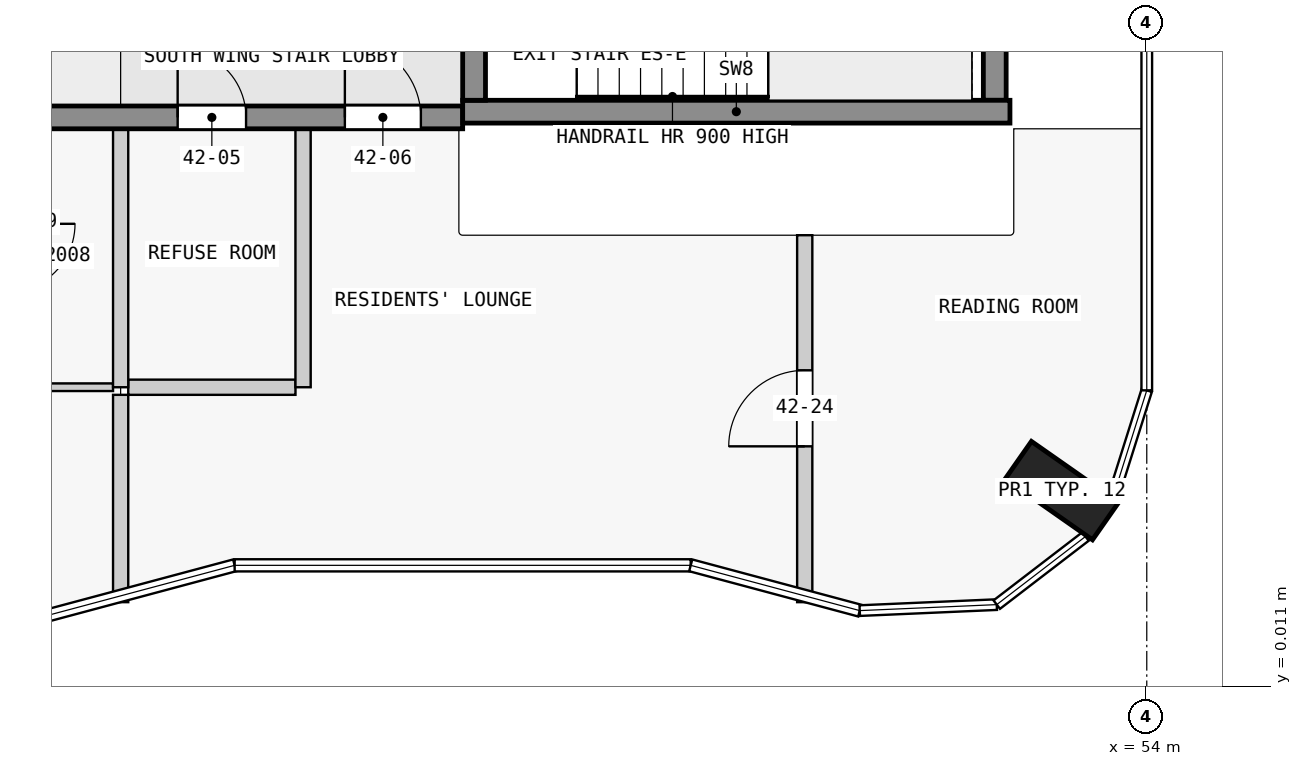
"""IFC4 building model, lengths in metres.
Left out: names, types, materials, properties, quantities, classifications, styles, units other than length and angle.
Written with IfcOpenShell. Run it as: python <this file> out.ifc"""

import sys

from ifc_helpers import new_model, si_unit, direction, frame, frame_2d, origin, origin_2d, place, context, subcontext, project, spatial, rectangle, extrude, element, fill, save


model = new_model("IFC4")
c1 = context("Model", 3, precision=1e-05, world=origin(), true_north=direction((0.0, 1.0)))
c2 = subcontext(c1, "Body", "Model", "MODEL_VIEW")
j1 = project(units=[si_unit("LENGTHUNIT", "METRE"), si_unit("PLANEANGLEUNIT", "RADIAN")], contexts=[c1])
p1 = place(None, origin())
s1 = spatial("IfcSite", under=j1, at=p1, CompositionType="ELEMENT")
p2 = place(p1, origin())
s2 = spatial("IfcBuilding", under=s1, at=p2, CompositionType="ELEMENT")
p3 = place(p2, frame((0.0, 0.0, 163.9)))
s3 = spatial("IfcBuildingStorey", under=s2, at=p3, CompositionType="ELEMENT", Elevation=163.9)
p4 = place(p3, frame((52.884, 2.59, 0.0), z_axis=(0.0, 0.0, 1.0), x_axis=(0.573542637991, 0.819175709117, 0.0)))
e1 = element("IfcColumn", 1, at=p4, inside=s3, PredefinedType="COLUMN", context=c2, shape_type="SweptSolid", body=[
    extrude(rectangle(XDim=0.6, YDim=1.4, at=origin_2d()), origin(), (0.0, 0.0, 1.0), 3.5),
])
p5 = place(p3, frame((45.15, 7.725, 0.0), z_axis=(0.0, 0.0, 1.0), x_axis=(0.0, 1.0, 0.0)))
e2 = element("IfcWall", 2, at=p5, inside=s3, PredefinedType="SHEAR", context=c2, shape_type="SweptSolid", body=[
    extrude(rectangle(XDim=2.55, YDim=0.3, at=frame_2d((1.275, 0.0))), origin(), (0.0, 0.0, 1.0), 3.5),
])
p6 = place(p5, frame((0.725, 0.0, 0.0)))
e3 = element("IfcOpeningElement", 3, at=p6, cuts=e2, PredefinedType="OPENING", context=c2, shape_type="SweptSolid", body=[
    extrude(rectangle(XDim=1.1, YDim=2.1, at=frame_2d((0.55, 1.05))), frame((0.0, 0.16, 0.0), z_axis=(0.0, -1.0, 0.0), x_axis=(1.0, 0.0, 0.0)), (0.0, 0.0, 1.0), 0.32),
])
p7 = place(p3, frame((52.0, 7.725, 0.0), z_axis=(0.0, 0.0, 1.0), x_axis=(0.0, 1.0, 0.0)))
e4 = element("IfcWall", 4, at=p7, inside=s3, PredefinedType="SHEAR", context=c2, shape_type="SweptSolid", body=[
    extrude(rectangle(XDim=2.55, YDim=0.3, at=frame_2d((1.275, 0.0))), origin(), (0.0, 0.0, 1.0), 3.5),
])
p8 = place(p3, frame((45.0, 7.575, 0.0), z_axis=(0.0, 0.0, 1.0), x_axis=(1.0, 0.0, 0.0)))
e5 = element("IfcWall", 5, at=p8, inside=s3, PredefinedType="SHEAR", context=c2, shape_type="SweptSolid", body=[
    extrude(rectangle(XDim=7.2, YDim=0.3, at=frame_2d((3.6, 0.0))), origin(), (0.0, 0.0, 1.0), 3.5),
])
p9 = place(p3, frame((22.5, 7.5, 0.0), z_axis=(0.0, 0.0, 1.0), x_axis=(1.0, 0.0, 0.0)))
e6 = element("IfcWall", 6, at=p9, inside=s3, PredefinedType="SHEAR", context=c2, shape_type="SweptSolid", body=[
    extrude(rectangle(XDim=22.5, YDim=0.3, at=frame_2d((11.25, 0.0))), origin(), (0.0, 0.0, 1.0), 3.25),
])
p10 = place(p9, frame((1.75, 0.0, 0.0)))
e7 = element("IfcOpeningElement", 7, at=p10, cuts=e6, PredefinedType="OPENING", context=c2, shape_type="SweptSolid", body=[
    extrude(rectangle(XDim=1.0, YDim=2.1, at=frame_2d((0.5, 1.05))), frame((0.0, 0.16, 0.0), z_axis=(0.0, -1.0, 0.0), x_axis=(1.0, 0.0, 0.0)), (0.0, 0.0, 1.0), 0.32),
])
p11 = place(p9, frame((6.25, 0.0, 0.0)))
e8 = element("IfcOpeningElement", 8, at=p11, cuts=e6, PredefinedType="OPENING", context=c2, shape_type="SweptSolid", body=[
    extrude(rectangle(XDim=1.0, YDim=2.1, at=frame_2d((0.5, 1.05))), frame((0.0, 0.16, 0.0), z_axis=(0.0, -1.0, 0.0), x_axis=(1.0, 0.0, 0.0)), (0.0, 0.0, 1.0), 0.32),
])
p12 = place(p9, frame((10.75, 0.0, 0.0)))
e9 = element("IfcOpeningElement", 9, at=p12, cuts=e6, PredefinedType="OPENING", context=c2, shape_type="SweptSolid", body=[
    extrude(rectangle(XDim=1.0, YDim=2.1, at=frame_2d((0.5, 1.05))), frame((0.0, 0.16, 0.0), z_axis=(0.0, -1.0, 0.0), x_axis=(1.0, 0.0, 0.0)), (0.0, 0.0, 1.0), 0.32),
])
p13 = place(p9, frame((15.25, 0.0, 0.0)))
e10 = element("IfcOpeningElement", 10, at=p13, cuts=e6, PredefinedType="OPENING", context=c2, shape_type="SweptSolid", body=[
    extrude(rectangle(XDim=1.0, YDim=2.1, at=frame_2d((0.5, 1.05))), frame((0.0, 0.16, 0.0), z_axis=(0.0, -1.0, 0.0), x_axis=(1.0, 0.0, 0.0)), (0.0, 0.0, 1.0), 0.32),
])
p14 = place(p9, frame((18.75, 0.0, 0.0)))
e11 = element("IfcOpeningElement", 11, at=p14, cuts=e6, PredefinedType="OPENING", context=c2, shape_type="SweptSolid", body=[
    extrude(rectangle(XDim=0.9, YDim=2.1, at=frame_2d((0.45, 1.05))), frame((0.0, 0.16, 0.0), z_axis=(0.0, -1.0, 0.0), x_axis=(1.0, 0.0, 0.0)), (0.0, 0.0, 1.0), 0.32),
])
p15 = place(p9, frame((20.95, 0.0, 0.0)))
e12 = element("IfcOpeningElement", 12, at=p15, cuts=e6, PredefinedType="OPENING", context=c2, shape_type="SweptSolid", body=[
    extrude(rectangle(XDim=1.0, YDim=2.1, at=frame_2d((0.5, 1.05))), frame((0.0, 0.16, 0.0), z_axis=(0.0, -1.0, 0.0), x_axis=(1.0, 0.0, 0.0)), (0.0, 0.0, 1.0), 0.32),
])
p16 = place(p3, frame((39.05, 3.95, 0.0), z_axis=(0.0, 0.0, 1.0), x_axis=(1.0, 0.0, 0.0)))
e13 = element("IfcWall", 13, at=p16, inside=s3, PredefinedType="PARTITIONING", context=c2, shape_type="SweptSolid", body=[
    extrude(rectangle(XDim=1.35, YDim=0.1, at=frame_2d((0.675, 0.0))), origin(), (0.0, 0.0, 1.0), 3.25),
])
p17 = place(p3, frame((40.6, 3.95, 0.0), z_axis=(0.0, 0.0, 1.0), x_axis=(1.0, 0.0, 0.0)))
e14 = element("IfcWall", 14, at=p17, inside=s3, PredefinedType="PARTITIONING", context=c2, shape_type="SweptSolid", body=[
    extrude(rectangle(XDim=2.2, YDim=0.2, at=frame_2d((1.1, 0.0))), origin(), (0.0, 0.0, 1.0), 3.25),
])
p18 = place(p3, frame((40.5, 3.85, 0.0), z_axis=(0.0, 0.0, 1.0), x_axis=(0.0, -1.0, 0.0)))
e15 = element("IfcWall", 15, at=p18, inside=s3, PredefinedType="PARTITIONING", context=c2, shape_type="SweptSolid", body=[
    extrude(rectangle(XDim=2.728, YDim=0.2, at=frame_2d((1.364, 0.0))), origin(), (0.0, 0.0, 1.0), 3.25),
])
for number, where, z_axis, x_axis in (
    (16, (40.5, 3.95, 0.0), (0.0, 0.0, 1.0), (0.0, 1.0, 0.0)),
    (17, (42.9, 3.95, 0.0), (0.0, 0.0, 1.0), (0.0, 1.0, 0.0)),
):
    element("IfcWall", number, at=place(p3, frame(where, z_axis=z_axis, x_axis=x_axis)), inside=s3, PredefinedType="PARTITIONING", context=c2, shape_type="SweptSolid", body=[
        extrude(rectangle(XDim=3.4, YDim=0.2, at=frame_2d((1.7, 0.0))), origin(), (0.0, 0.0, 1.0), 3.25),
    ])
p19 = place(p3, frame((49.5, 1.122, 0.0), z_axis=(0.0, 0.0, 1.0), x_axis=(0.0, 1.0, 0.0)))
e18 = element("IfcWall", 18, at=p19, inside=s3, PredefinedType="PARTITIONING", context=c2, shape_type="SweptSolid", body=[
    extrude(rectangle(XDim=4.828, YDim=0.2, at=frame_2d((2.414, 0.0))), origin(), (0.0, 0.0, 1.0), 3.25),
])
p20 = place(p19, frame((2.05, 0.0, 0.0)))
e19 = element("IfcOpeningElement", 19, at=p20, cuts=e18, PredefinedType="OPENING", context=c2, shape_type="SweptSolid", body=[
    extrude(rectangle(XDim=1.0, YDim=2.1, at=frame_2d((0.5, 1.05))), frame((0.0, 0.11, 0.0), z_axis=(0.0, -1.0, 0.0), x_axis=(1.0, 0.0, 0.0)), (0.0, 0.0, 1.0), 0.22),
])
p21 = place(p14, origin())
e20 = element("IfcDoor", 20, at=p21, inside=s3, OperationType="SINGLE_SWING_RIGHT", PredefinedType="DOOR", context=c2, shape_type="SweptSolid", body=[
    extrude(rectangle(XDim=0.9, YDim=2.1, at=frame_2d((0.45, 1.05))), frame((0.0, 0.025, 0.0), z_axis=(0.0, -1.0, 0.0), x_axis=(1.0, 0.0, 0.0)), (0.0, 0.0, 1.0), 0.05),
])
fill(e11, e20)
p22 = place(p15, origin())
e21 = element("IfcDoor", 21, at=p22, inside=s3, OperationType="SINGLE_SWING_RIGHT", PredefinedType="DOOR", context=c2, shape_type="SweptSolid", body=[
    extrude(rectangle(XDim=1.0, YDim=2.1, at=frame_2d((0.5, 1.05))), frame((0.0, 0.025, 0.0), z_axis=(0.0, -1.0, 0.0), x_axis=(1.0, 0.0, 0.0)), (0.0, 0.0, 1.0), 0.05),
])
fill(e12, e21)
p23 = place(p20, origin())
e22 = element("IfcDoor", 22, at=p23, inside=s3, OperationType="SINGLE_SWING_RIGHT", PredefinedType="DOOR", context=c2, shape_type="SweptSolid", body=[
    extrude(rectangle(XDim=1.0, YDim=2.1, at=frame_2d((0.5, 1.05))), frame((0.0, 0.025, 0.0), z_axis=(0.0, -1.0, 0.0), x_axis=(1.0, 0.0, 0.0)), (0.0, 0.0, 1.0), 0.05),
])
fill(e19, e22)
save(model, sys.argv[1])
